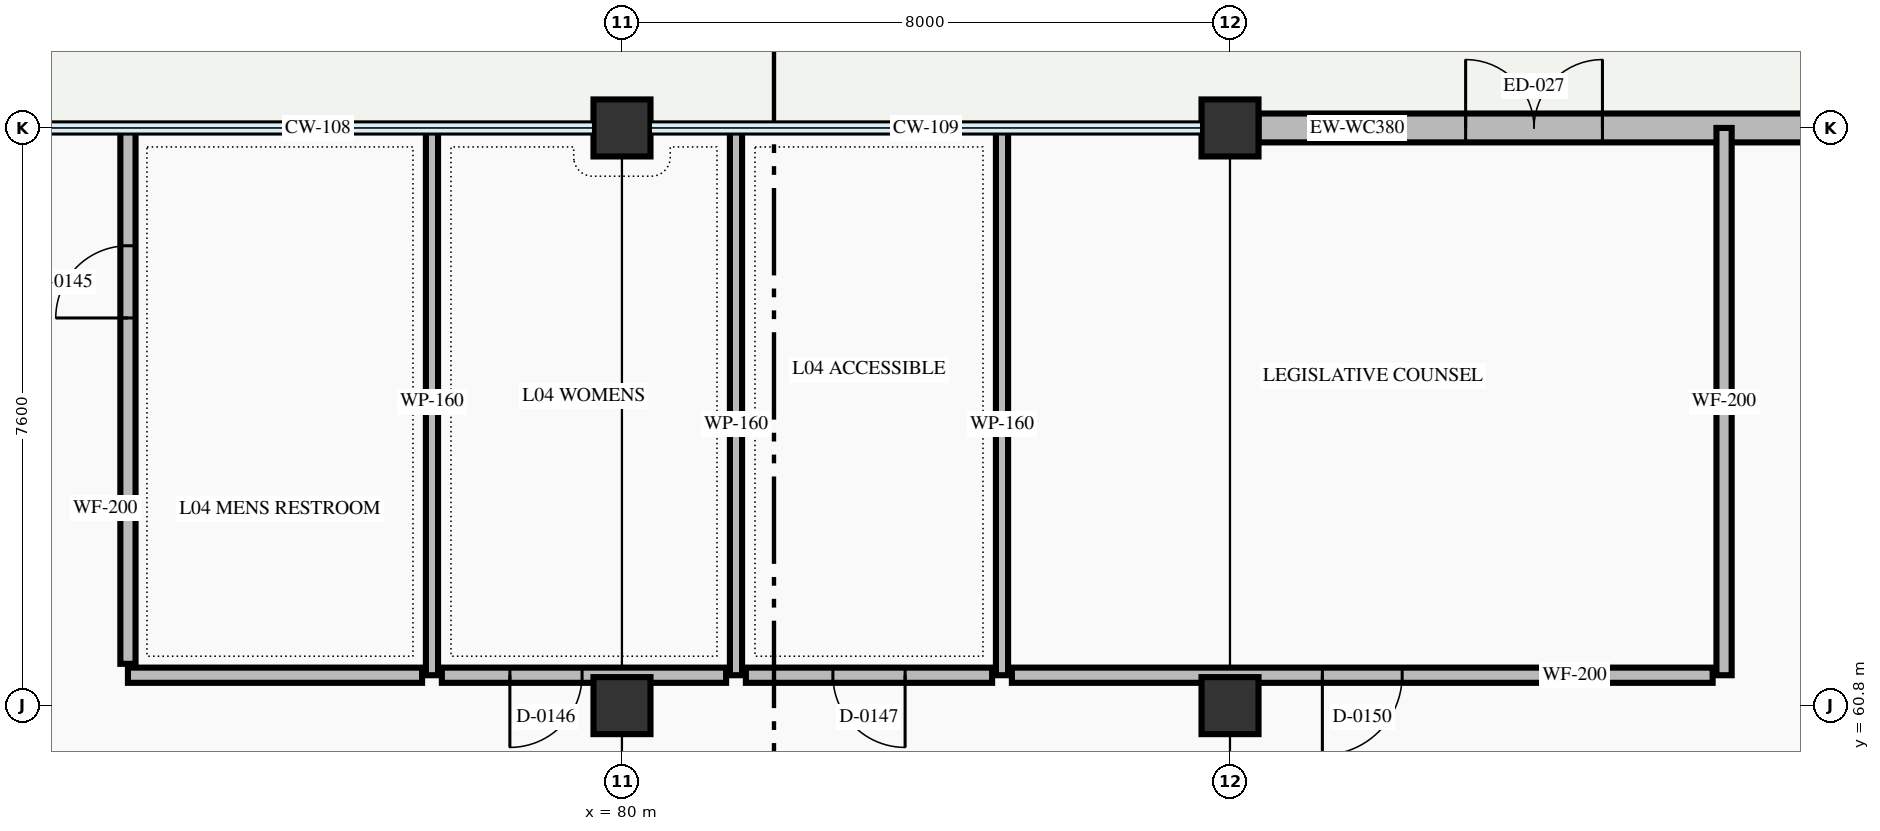
"""IFC4 building model, lengths in metres.
Left out: names, types, materials, properties, quantities, classifications, styles, units other than length and angle.
Written with IfcOpenShell. Run it as: python <this file> out.ifc"""

import sys

from ifc_helpers import new_model, si_unit, direction, frame, frame_2d, origin, origin_2d, place, context, subcontext, project, spatial, rectangle, extrude, element, fill, save


model = new_model("IFC4")
c1 = context("Model", 3, precision=1e-05, world=origin(), true_north=direction((0.0, 1.0)))
c2 = subcontext(c1, "Body", "Model", "MODEL_VIEW")
j1 = project(units=[si_unit("LENGTHUNIT", "METRE"), si_unit("PLANEANGLEUNIT", "RADIAN")], contexts=[c1])
p1 = place(None, origin())
s1 = spatial("IfcSite", under=j1, at=p1, CompositionType="ELEMENT")
p2 = place(p1, origin())
s2 = spatial("IfcBuilding", under=s1, at=p2, CompositionType="ELEMENT")
p3 = place(p2, frame((0.0, 0.0, 14.7)))
s3 = spatial("IfcBuildingStorey", under=s2, at=p3, CompositionType="ELEMENT", Elevation=14.7)
for number, where, z_axis, x_axis in (
    (1, (80.0, 60.8, 0.0), (0.0, 0.0, 1.0), (1.0, 0.0, 0.0)),
    (2, (80.0, 68.4, 0.0), (0.0, 0.0, 1.0), (1.0, 0.0, 0.0)),
    (3, (88.0, 60.8, 0.0), (0.0, 0.0, 1.0), (1.0, 0.0, 0.0)),
    (4, (88.0, 68.4, 0.0), (0.0, 0.0, 1.0), (1.0, 0.0, 0.0)),
):
    element("IfcColumn", number, at=place(p3, frame(where, z_axis=z_axis, x_axis=x_axis)), inside=s3, PredefinedType="COLUMN", context=c2, shape_type="SweptSolid", body=[
        extrude(rectangle(XDim=0.75, YDim=0.75, at=origin_2d()), origin(), (0.0, 0.0, 1.0), 4.2),
    ])
p4 = place(p3, frame((88.375, 68.4, 0.0), z_axis=(0.0, 0.0, 1.0), x_axis=(1.0, 0.0, 0.0)))
e5 = element("IfcWall", 5, at=p4, inside=s3, PredefinedType="STANDARD", context=c2, shape_type="SweptSolid", body=[
    extrude(rectangle(XDim=7.25, YDim=0.38, at=frame_2d((3.625, 0.0))), origin(), (0.0, 0.0, 1.0), 3.07),
])
p5 = place(p4, frame((2.725, 0.0, 0.0)))
e6 = element("IfcOpeningElement", 6, at=p5, cuts=e5, PredefinedType="OPENING", context=c2, shape_type="SweptSolid", body=[
    extrude(rectangle(XDim=1.8, YDim=2.4, at=frame_2d((0.9, 1.2))), frame((0.0, 0.2, 0.0), z_axis=(0.0, -1.0, 0.0), x_axis=(1.0, 0.0, 0.0)), (0.0, 0.0, 1.0), 0.4),
])
p6 = place(p3, frame((77.5, 68.4, 0.0), z_axis=(0.0, 0.0, 1.0), x_axis=(0.0, -1.0, 0.0)))
e7 = element("IfcWall", 7, at=p6, inside=s3, PredefinedType="PARTITIONING", context=c2, shape_type="SweptSolid", body=[
    extrude(rectangle(XDim=7.2, YDim=0.16, at=frame_2d((3.6, 0.0))), origin(), (0.0, 0.0, 1.0), 3.93),
])
p7 = place(p3, frame((77.37, 61.2, 0.0), z_axis=(0.0, 0.0, 1.0), x_axis=(-1.0, 0.0, 0.0)))
e8 = element("IfcWall", 8, at=p7, inside=s3, PredefinedType="STANDARD", context=c2, shape_type="SweptSolid", body=[
    extrude(rectangle(XDim=3.87, YDim=0.2, at=frame_2d((1.935, 0.0))), origin(), (0.0, 0.0, 1.0), 3.93),
])
p8 = place(p3, frame((73.5, 61.35, 0.0), z_axis=(0.0, 0.0, 1.0), x_axis=(0.0, 1.0, 0.0)))
e9 = element("IfcWall", 9, at=p8, inside=s3, PredefinedType="STANDARD", context=c2, shape_type="SweptSolid", body=[
    extrude(rectangle(XDim=7.05, YDim=0.2, at=frame_2d((3.525, 0.0))), origin(), (0.0, 0.0, 1.0), 3.93),
])
p9 = place(p8, frame((4.55, 0.0, 0.0)))
e10 = element("IfcOpeningElement", 10, at=p9, cuts=e9, PredefinedType="OPENING", context=c2, shape_type="SweptSolid", body=[
    extrude(rectangle(XDim=0.95, YDim=2.15, at=frame_2d((0.475, 1.075))), frame((0.0, 0.11, 0.0), z_axis=(0.0, -1.0, 0.0), x_axis=(1.0, 0.0, 0.0)), (0.0, 0.0, 1.0), 0.22),
])
p10 = place(p3, frame((81.5, 68.4, 0.0), z_axis=(0.0, 0.0, 1.0), x_axis=(0.0, -1.0, 0.0)))
e11 = element("IfcWall", 11, at=p10, inside=s3, PredefinedType="PARTITIONING", context=c2, shape_type="SweptSolid", body=[
    extrude(rectangle(XDim=7.2, YDim=0.16, at=frame_2d((3.6, 0.0))), origin(), (0.0, 0.0, 1.0), 3.93),
])
p11 = place(p3, frame((81.37, 61.2, 0.0), z_axis=(0.0, 0.0, 1.0), x_axis=(-1.0, 0.0, 0.0)))
e12 = element("IfcWall", 12, at=p11, inside=s3, PredefinedType="STANDARD", context=c2, shape_type="SweptSolid", body=[
    extrude(rectangle(XDim=3.74, YDim=0.2, at=frame_2d((1.87, 0.0))), origin(), (0.0, 0.0, 1.0), 3.93),
])
p12 = place(p11, frame((1.895, 0.0, 0.0)))
e13 = element("IfcOpeningElement", 13, at=p12, cuts=e12, PredefinedType="OPENING", context=c2, shape_type="SweptSolid", body=[
    extrude(rectangle(XDim=0.95, YDim=2.15, at=frame_2d((0.475, 1.075))), frame((0.0, 0.11, 0.0), z_axis=(0.0, -1.0, 0.0), x_axis=(1.0, 0.0, 0.0)), (0.0, 0.0, 1.0), 0.22),
])
p13 = place(p3, frame((85.0, 68.4, 0.0), z_axis=(0.0, 0.0, 1.0), x_axis=(0.0, -1.0, 0.0)))
e14 = element("IfcWall", 14, at=p13, inside=s3, PredefinedType="PARTITIONING", context=c2, shape_type="SweptSolid", body=[
    extrude(rectangle(XDim=7.2, YDim=0.16, at=frame_2d((3.6, 0.0))), origin(), (0.0, 0.0, 1.0), 3.93),
])
p14 = place(p3, frame((84.87, 61.2, 0.0), z_axis=(0.0, 0.0, 1.0), x_axis=(-1.0, 0.0, 0.0)))
e15 = element("IfcWall", 15, at=p14, inside=s3, PredefinedType="STANDARD", context=c2, shape_type="SweptSolid", body=[
    extrude(rectangle(XDim=3.24, YDim=0.2, at=frame_2d((1.62, 0.0))), origin(), (0.0, 0.0, 1.0), 3.93),
])
p15 = place(p14, frame((1.145, 0.0, 0.0)))
e16 = element("IfcOpeningElement", 16, at=p15, cuts=e15, PredefinedType="OPENING", context=c2, shape_type="SweptSolid", body=[
    extrude(rectangle(XDim=0.95, YDim=2.15, at=frame_2d((0.475, 1.075))), frame((0.0, 0.11, 0.0), z_axis=(0.0, -1.0, 0.0), x_axis=(1.0, 0.0, 0.0)), (0.0, 0.0, 1.0), 0.22),
])
p16 = place(p3, frame((94.5, 68.4, 0.0), z_axis=(0.0, 0.0, 1.0), x_axis=(0.0, -1.0, 0.0)))
e17 = element("IfcWall", 17, at=p16, inside=s3, PredefinedType="STANDARD", context=c2, shape_type="SweptSolid", body=[
    extrude(rectangle(XDim=7.2, YDim=0.2, at=frame_2d((3.6, 0.0))), origin(), (0.0, 0.0, 1.0), 3.93),
])
p17 = place(p3, frame((94.35, 61.2, 0.0), z_axis=(0.0, 0.0, 1.0), x_axis=(-1.0, 0.0, 0.0)))
e18 = element("IfcWall", 18, at=p17, inside=s3, PredefinedType="STANDARD", context=c2, shape_type="SweptSolid", body=[
    extrude(rectangle(XDim=9.22, YDim=0.2, at=frame_2d((4.61, 0.0))), origin(), (0.0, 0.0, 1.0), 3.93),
])
p18 = place(p17, frame((4.085, 0.0, 0.0)))
e19 = element("IfcOpeningElement", 19, at=p18, cuts=e18, PredefinedType="OPENING", context=c2, shape_type="SweptSolid", body=[
    extrude(rectangle(XDim=1.05, YDim=2.15, at=frame_2d((0.525, 1.075))), frame((0.0, 0.11, 0.0), z_axis=(0.0, -1.0, 0.0), x_axis=(1.0, 0.0, 0.0)), (0.0, 0.0, 1.0), 0.22),
])
p19 = place(p5, origin())
e20 = element("IfcDoor", 20, at=p19, inside=s3, OperationType="DOUBLE_DOOR_SINGLE_SWING", PredefinedType="DOOR", context=c2, shape_type="SweptSolid", body=[
    extrude(rectangle(XDim=1.8, YDim=2.4, at=frame_2d((0.9, 1.2))), frame((0.0, 0.025, 0.0), z_axis=(0.0, -1.0, 0.0), x_axis=(1.0, 0.0, 0.0)), (0.0, 0.0, 1.0), 0.05),
])
fill(e6, e20)
p20 = place(p9, origin())
e21 = element("IfcDoor", 21, at=p20, inside=s3, OperationType="SINGLE_SWING_LEFT", PredefinedType="DOOR", context=c2, shape_type="SweptSolid", body=[
    extrude(rectangle(XDim=0.95, YDim=2.15, at=frame_2d((0.475, 1.075))), frame((0.0, 0.025, 0.0), z_axis=(0.0, -1.0, 0.0), x_axis=(1.0, 0.0, 0.0)), (0.0, 0.0, 1.0), 0.05),
])
fill(e10, e21)
p21 = place(p12, origin())
e22 = element("IfcDoor", 22, at=p21, inside=s3, OperationType="SINGLE_SWING_RIGHT", PredefinedType="DOOR", context=c2, shape_type="SweptSolid", body=[
    extrude(rectangle(XDim=0.95, YDim=2.15, at=frame_2d((0.475, 1.075))), frame((0.0, 0.025, 0.0), z_axis=(0.0, -1.0, 0.0), x_axis=(1.0, 0.0, 0.0)), (0.0, 0.0, 1.0), 0.05),
])
fill(e13, e22)
p22 = place(p15, origin())
e23 = element("IfcDoor", 23, at=p22, inside=s3, OperationType="SINGLE_SWING_LEFT", PredefinedType="DOOR", context=c2, shape_type="SweptSolid", body=[
    extrude(rectangle(XDim=0.95, YDim=2.15, at=frame_2d((0.475, 1.075))), frame((0.0, 0.025, 0.0), z_axis=(0.0, -1.0, 0.0), x_axis=(1.0, 0.0, 0.0)), (0.0, 0.0, 1.0), 0.05),
])
fill(e16, e23)
p23 = place(p18, origin())
e24 = element("IfcDoor", 24, at=p23, inside=s3, OperationType="SINGLE_SWING_RIGHT", PredefinedType="DOOR", context=c2, shape_type="SweptSolid", body=[
    extrude(rectangle(XDim=1.05, YDim=2.15, at=frame_2d((0.525, 1.075))), frame((0.0, 0.025, 0.0), z_axis=(0.0, -1.0, 0.0), x_axis=(1.0, 0.0, 0.0)), (0.0, 0.0, 1.0), 0.05),
])
fill(e19, e24)
save(model, sys.argv[1])
